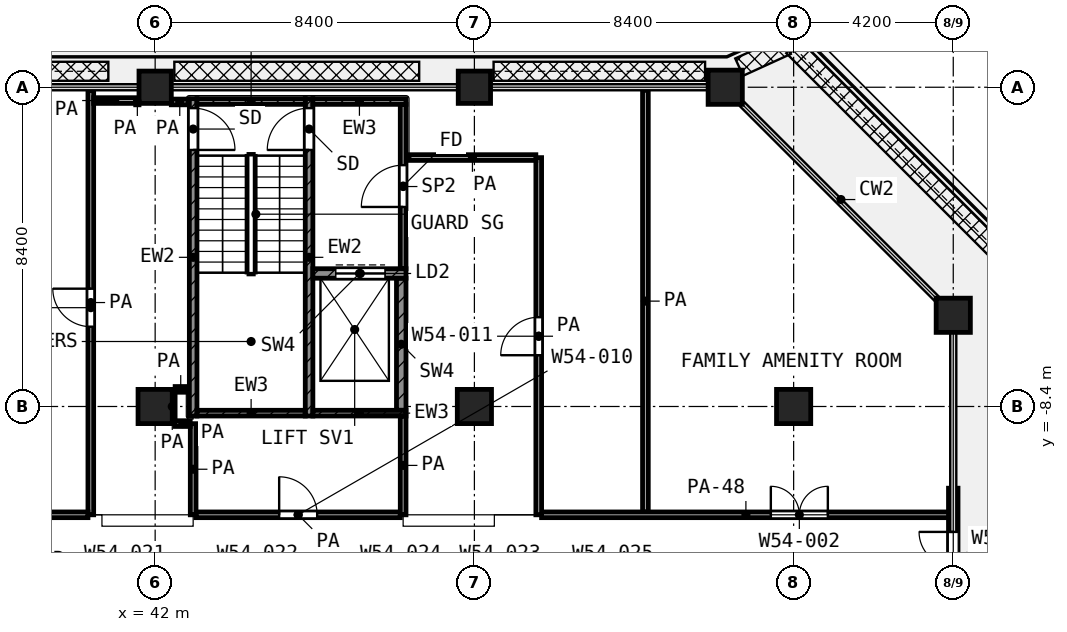
"""IFC4 building model, lengths in metres.
Left out: names, types, materials, properties, quantities, classifications, styles, units other than length and angle.
Written with IfcOpenShell. Run it as: python <this file> out.ifc"""

import sys

from ifc_helpers import new_model, si_unit, direction, frame, frame_2d, origin, origin_2d, place, context, subcontext, project, spatial, rectangle, extrude, element, fill, save


model = new_model("IFC4")
c1 = context("Model", 3, precision=1e-05, world=origin(), true_north=direction((0.0, 1.0)))
c2 = subcontext(c1, "Body", "Model", "MODEL_VIEW")
j1 = project(units=[si_unit("LENGTHUNIT", "METRE"), si_unit("PLANEANGLEUNIT", "RADIAN")], contexts=[c1])
p1 = place(None, origin())
s1 = spatial("IfcSite", under=j1, at=p1, CompositionType="ELEMENT")
p2 = place(p1, origin())
s2 = spatial("IfcBuilding", under=s1, at=p2, CompositionType="ELEMENT")
p3 = place(p2, frame((0.0, 0.0, 255.8)))
s3 = spatial("IfcBuildingStorey", under=s2, at=p3, CompositionType="ELEMENT", Elevation=255.8)
for number, where, z_axis, x_axis in (
    (1, (42.0, 0.0, 0.0), (0.0, 0.0, 1.0), (1.0, 0.0, 0.0)),
    (2, (50.4, 0.0, 0.0), (0.0, 0.0, 1.0), (1.0, 0.0, 0.0)),
):
    element("IfcColumn", number, at=place(p3, frame(where, z_axis=z_axis, x_axis=x_axis)), inside=s3, PredefinedType="COLUMN", context=c2, shape_type="SweptSolid", body=[
        extrude(rectangle(XDim=0.85, YDim=0.85, at=origin_2d()), origin(), (0.0, 0.0, 1.0), 4.2),
    ])
for number, where, z_axis, x_axis in (
    (3, (57.0, 0.0, 0.0), (0.0, 0.0, 1.0), (1.0, 0.0, 0.0)),
    (4, (63.0, -6.0, 0.0), (0.0, 0.0, 1.0), (1.0, 0.0, 0.0)),
    (5, (42.0, -8.4, 0.0), (0.0, 0.0, 1.0), (1.0, 0.0, 0.0)),
    (6, (50.4, -8.4, 0.0), (0.0, 0.0, 1.0), (1.0, 0.0, 0.0)),
    (7, (58.8, -8.4, 0.0), (0.0, 0.0, 1.0), (1.0, 0.0, 0.0)),
):
    element("IfcColumn", number, at=place(p3, frame(where, z_axis=z_axis, x_axis=x_axis)), inside=s3, PredefinedType="COLUMN", context=c2, shape_type="SweptSolid", body=[
        extrude(rectangle(XDim=0.9, YDim=0.9, at=origin_2d()), origin(), (0.0, 0.0, 1.0), 4.2),
    ])
p4 = place(p3, frame((63.0, -14.65, 0.0), z_axis=(0.0, 0.0, 1.0), x_axis=(0.0, 1.0, 0.0)))
e8 = element("IfcWall", 8, at=p4, inside=s3, PredefinedType="SOLIDWALL", context=c2, shape_type="SweptSolid", body=[
    extrude(rectangle(XDim=4.1, YDim=0.25, at=frame_2d((2.05, 0.0))), origin(), (0.0, 0.0, 1.0), 2.58),
])
p5 = place(p4, frame((1.15, 0.0, 0.0)))
e9 = element("IfcOpeningElement", 9, at=p5, cuts=e8, PredefinedType="OPENING", context=c2, shape_type="SweptSolid", body=[
    extrude(rectangle(XDim=1.8, YDim=2.1, at=frame_2d((0.9, 1.05))), frame((0.0, 0.135, 0.0), z_axis=(0.0, -1.0, 0.0), x_axis=(1.0, 0.0, 0.0)), (0.0, 0.0, 1.0), 0.27),
])
p6 = place(p3, frame((43.0, -8.65, 0.0), z_axis=(0.0, 0.0, 1.0), x_axis=(0.0, 1.0, 0.0)))
e10 = element("IfcWall", 10, at=p6, inside=s3, PredefinedType="SHEAR", context=c2, shape_type="SweptSolid", body=[
    extrude(rectangle(XDim=8.35, YDim=0.2, at=frame_2d((4.175, 0.0))), origin(), (0.0, 0.0, 1.0), 3.6),
])
p7 = place(p6, frame((7.0, 0.0, 0.0)))
e11 = element("IfcOpeningElement", 11, at=p7, cuts=e10, PredefinedType="OPENING", context=c2, shape_type="SweptSolid", body=[
    extrude(rectangle(XDim=1.1, YDim=2.1, at=frame_2d((0.55, 1.05))), frame((0.0, 0.11, 0.0), z_axis=(0.0, -1.0, 0.0), x_axis=(1.0, 0.0, 0.0)), (0.0, 0.0, 1.0), 0.22),
])
p8 = place(p3, frame((46.05, -8.65, 0.0), z_axis=(0.0, 0.0, 1.0), x_axis=(0.0, 1.0, 0.0)))
e12 = element("IfcWall", 12, at=p8, inside=s3, PredefinedType="SHEAR", context=c2, shape_type="SweptSolid", body=[
    extrude(rectangle(XDim=8.35, YDim=0.2, at=frame_2d((4.175, 0.0))), origin(), (0.0, 0.0, 1.0), 3.6),
])
p9 = place(p8, frame((7.0, 0.0, 0.0)))
e13 = element("IfcOpeningElement", 13, at=p9, cuts=e12, PredefinedType="OPENING", context=c2, shape_type="SweptSolid", body=[
    extrude(rectangle(XDim=1.1, YDim=2.1, at=frame_2d((0.55, 1.05))), frame((0.0, 0.11, 0.0), z_axis=(0.0, -1.0, 0.0), x_axis=(1.0, 0.0, 0.0)), (0.0, 0.0, 1.0), 0.22),
])
p10 = place(p3, frame((43.1, -0.375, 0.0), z_axis=(0.0, 0.0, 1.0), x_axis=(1.0, 0.0, 0.0)))
e14 = element("IfcWall", 14, at=p10, inside=s3, PredefinedType="SHEAR", context=c2, shape_type="SweptSolid", body=[
    extrude(rectangle(XDim=2.85, YDim=0.15, at=frame_2d((1.425, 0.0))), origin(), (0.0, 0.0, 1.0), 3.6),
])
p11 = place(p3, frame((46.15, -0.375, 0.0), z_axis=(0.0, 0.0, 1.0), x_axis=(1.0, 0.0, 0.0)))
e15 = element("IfcWall", 15, at=p11, inside=s3, PredefinedType="SHEAR", context=c2, shape_type="SweptSolid", body=[
    extrude(rectangle(XDim=2.45, YDim=0.15, at=frame_2d((1.225, 0.0))), origin(), (0.0, 0.0, 1.0), 3.6),
])
p12 = place(p3, frame((43.1, -8.575, 0.0), z_axis=(0.0, 0.0, 1.0), x_axis=(1.0, 0.0, 0.0)))
e16 = element("IfcWall", 16, at=p12, inside=s3, PredefinedType="SHEAR", context=c2, shape_type="SweptSolid", body=[
    extrude(rectangle(XDim=2.85, YDim=0.15, at=frame_2d((1.425, 0.0))), origin(), (0.0, 0.0, 1.0), 3.6),
])
p13 = place(p3, frame((46.15, -8.575, 0.0), z_axis=(0.0, 0.0, 1.0), x_axis=(1.0, 0.0, 0.0)))
e17 = element("IfcWall", 17, at=p13, inside=s3, PredefinedType="SHEAR", context=c2, shape_type="SweptSolid", body=[
    extrude(rectangle(XDim=2.45, YDim=0.15, at=frame_2d((1.225, 0.0))), origin(), (0.0, 0.0, 1.0), 3.6),
])
p14 = place(p3, frame((46.15, -4.9, 0.0), z_axis=(0.0, 0.0, 1.0), x_axis=(1.0, 0.0, 0.0)))
e18 = element("IfcWall", 18, at=p14, inside=s3, PredefinedType="SHEAR", context=c2, shape_type="SweptSolid", body=[
    extrude(rectangle(XDim=2.45, YDim=0.25, at=frame_2d((1.225, 0.0))), origin(), (0.0, 0.0, 1.0), 3.6),
])
p15 = place(p14, frame((0.6, 0.0, 0.0)))
e19 = element("IfcOpeningElement", 19, at=p15, cuts=e18, PredefinedType="OPENING", context=c2, shape_type="SweptSolid", body=[
    extrude(rectangle(XDim=1.3, YDim=2.1, at=frame_2d((0.65, 1.05))), frame((0.0, 0.135, 0.0), z_axis=(0.0, -1.0, 0.0), x_axis=(1.0, 0.0, 0.0)), (0.0, 0.0, 1.0), 0.27),
])
p16 = place(p3, frame((48.475, -8.5, 0.0), z_axis=(0.0, 0.0, 1.0), x_axis=(0.0, 1.0, 0.0)))
e20 = element("IfcWall", 20, at=p16, inside=s3, PredefinedType="SHEAR", context=c2, shape_type="SweptSolid", body=[
    extrude(rectangle(XDim=3.475, YDim=0.25, at=frame_2d((1.738, 0.0))), origin(), (0.0, 0.0, 1.0), 3.6),
])
p17 = place(p3, frame((48.525, -4.775, 0.0), z_axis=(0.0, 0.0, 1.0), x_axis=(0.0, 1.0, 0.0)))
e21 = element("IfcWall", 21, at=p17, inside=s3, PredefinedType="PARTITIONING", context=c2, shape_type="SweptSolid", body=[
    extrude(rectangle(XDim=4.325, YDim=0.15, at=frame_2d((2.163, 0.0))), origin(), (0.0, 0.0, 1.0), 3.6),
])
p18 = place(p17, frame((1.625, 0.0, 0.0)))
e22 = element("IfcOpeningElement", 22, at=p18, cuts=e21, PredefinedType="OPENING", context=c2, shape_type="SweptSolid", body=[
    extrude(rectangle(XDim=1.1, YDim=2.1, at=frame_2d((0.55, 1.05))), frame((0.0, 0.085, 0.0), z_axis=(0.0, -1.0, 0.0), x_axis=(1.0, 0.0, 0.0)), (0.0, 0.0, 1.0), 0.17),
])
p19 = place(p3, frame((29.4, -11.25, 0.0), z_axis=(0.0, 0.0, 1.0), x_axis=(1.0, 0.0, 0.0)))
e23 = element("IfcWall", 23, at=p19, inside=s3, PredefinedType="PARTITIONING", context=c2, shape_type="SweptSolid", body=[
    extrude(rectangle(XDim=10.832, YDim=0.15, at=frame_2d((5.416, 0.0))), origin(), (0.0, 0.0, 1.0), 3.6),
])
p20 = place(p19, frame((1.5, 0.0, 0.0)))
e24 = element("IfcOpeningElement", 24, at=p20, cuts=e23, PredefinedType="OPENING", context=c2, shape_type="SweptSolid", body=[
    extrude(rectangle(XDim=1.2, YDim=2.1, at=frame_2d((0.6, 1.05))), frame((0.0, 0.085, 0.0), z_axis=(0.0, -1.0, 0.0), x_axis=(1.0, 0.0, 0.0)), (0.0, 0.0, 1.0), 0.17),
])
p21 = place(p3, frame((43.075, -11.25, 0.0), z_axis=(0.0, 0.0, 1.0), x_axis=(1.0, 0.0, 0.0)))
e25 = element("IfcWall", 25, at=p21, inside=s3, PredefinedType="PARTITIONING", context=c2, shape_type="SweptSolid", body=[
    extrude(rectangle(XDim=5.375, YDim=0.15, at=frame_2d((2.688, 0.0))), origin(), (0.0, 0.0, 1.0), 3.6),
])
p22 = place(p21, frame((2.188, 0.0, 0.0)))
e26 = element("IfcOpeningElement", 26, at=p22, cuts=e25, PredefinedType="OPENING", context=c2, shape_type="SweptSolid", body=[
    extrude(rectangle(XDim=1.0, YDim=2.1, at=frame_2d((0.5, 1.05))), frame((0.0, 0.085, 0.0), z_axis=(0.0, -1.0, 0.0), x_axis=(1.0, 0.0, 0.0)), (0.0, 0.0, 1.0), 0.17),
])
p23 = place(p3, frame((52.168, -11.25, 0.0), z_axis=(0.0, 0.0, 1.0), x_axis=(1.0, 0.0, 0.0)))
e27 = element("IfcWall", 27, at=p23, inside=s3, PredefinedType="PARTITIONING", context=c2, shape_type="SweptSolid", body=[
    extrude(rectangle(XDim=10.752, YDim=0.15, at=frame_2d((5.376, 0.0))), origin(), (0.0, 0.0, 1.0), 2.7),
])
p24 = place(p23, frame((6.032, 0.0, 0.0)))
e28 = element("IfcOpeningElement", 28, at=p24, cuts=e27, PredefinedType="OPENING", context=c2, shape_type="SweptSolid", body=[
    extrude(rectangle(XDim=1.5, YDim=2.1, at=frame_2d((0.75, 1.05))), frame((0.0, 0.085, 0.0), z_axis=(0.0, -1.0, 0.0), x_axis=(1.0, 0.0, 0.0)), (0.0, 0.0, 1.0), 0.17),
])
p25 = place(p3, frame((42.525, -8.85, 0.0), z_axis=(0.0, 0.0, 1.0), x_axis=(1.0, 0.0, 0.0)))
e29 = element("IfcWall", 29, at=p25, inside=s3, PredefinedType="PARTITIONING", context=c2, shape_type="SweptSolid", body=[
    extrude(rectangle(XDim=0.398, YDim=0.15, at=frame_2d((0.199, 0.0))), origin(), (0.0, 0.0, 1.0), 3.6),
])
p26 = place(p3, frame((42.526, -7.95, 0.0), z_axis=(0.0, 0.0, 1.0), x_axis=(1.0, 0.0, 0.0)))
e30 = element("IfcWall", 30, at=p26, inside=s3, PredefinedType="PARTITIONING", context=c2, shape_type="SweptSolid", body=[
    extrude(rectangle(XDim=0.294, YDim=0.15, at=frame_2d((0.147, 0.0))), origin(), (0.0, 0.0, 1.0), 3.6),
])
p27 = place(p3, frame((48.68, -1.85, 0.0), z_axis=(0.0, 0.0, 1.0), x_axis=(1.0, 0.0, 0.0)))
e31 = element("IfcWall", 31, at=p27, inside=s3, PredefinedType="PARTITIONING", context=c2, shape_type="SweptSolid", body=[
    extrude(rectangle(XDim=3.337, YDim=0.15, at=frame_2d((1.668, 0.0))), origin(), (0.0, 0.0, 1.0), 3.6),
])
p28 = place(p3, frame((41.488, -0.387, 0.0), z_axis=(0.0, 0.0, 1.0), x_axis=(1.0, 0.0, 0.0)))
e32 = element("IfcWall", 32, at=p28, inside=s3, PredefinedType="PARTITIONING", context=c2, shape_type="SweptSolid", body=[
    extrude(rectangle(XDim=0.087, YDim=0.15, at=frame_2d((0.043, 0.0))), origin(), (0.0, 0.0, 1.0), 3.6),
])
p29 = place(p3, frame((42.425, -0.387, 0.0), z_axis=(0.0, 0.0, 1.0), x_axis=(1.0, 0.0, 0.0)))
e33 = element("IfcWall", 33, at=p29, inside=s3, PredefinedType="PARTITIONING", context=c2, shape_type="SweptSolid", body=[
    extrude(rectangle(XDim=0.445, YDim=0.15, at=frame_2d((0.223, 0.0))), origin(), (0.0, 0.0, 1.0), 3.6),
])
p30 = place(p3, frame((40.382, -0.35, 0.0), z_axis=(0.0, 0.0, 1.0), x_axis=(1.0, 0.0, 0.0)))
e34 = element("IfcWall", 34, at=p30, inside=s3, PredefinedType="PARTITIONING", context=c2, shape_type="SweptSolid", body=[
    extrude(rectangle(XDim=1.106, YDim=0.15, at=frame_2d((0.553, 0.0))), origin(), (0.0, 0.0, 1.0), 3.6),
])
p31 = place(p3, frame((40.307, -11.25, 0.0), z_axis=(0.0, 0.0, 1.0), x_axis=(0.0, 1.0, 0.0)))
e35 = element("IfcWall", 35, at=p31, inside=s3, PredefinedType="PARTITIONING", context=c2, shape_type="SweptSolid", body=[
    extrude(rectangle(XDim=11.17, YDim=0.15, at=frame_2d((5.585, 0.0))), origin(), (0.0, 0.0, 1.0), 3.6),
])
p32 = place(p31, frame((4.95, 0.0, 0.0)))
e36 = element("IfcOpeningElement", 36, at=p32, cuts=e35, PredefinedType="OPENING", context=c2, shape_type="SweptSolid", body=[
    extrude(rectangle(XDim=1.0, YDim=2.1, at=frame_2d((0.5, 1.05))), frame((0.0, 0.085, 0.0), z_axis=(0.0, -1.0, 0.0), x_axis=(1.0, 0.0, 0.0)), (0.0, 0.0, 1.0), 0.17),
])
p33 = place(p3, frame((42.45, -8.85, 0.0), z_axis=(0.0, 0.0, 1.0), x_axis=(0.0, 1.0, 0.0)))
e37 = element("IfcWall", 37, at=p33, inside=s3, PredefinedType="PARTITIONING", context=c2, shape_type="SweptSolid", body=[
    extrude(rectangle(XDim=0.899, YDim=0.15, at=frame_2d((0.45, 0.0))), origin(), (0.0, 0.0, 1.0), 3.6),
])
p34 = place(p3, frame((43.0, -11.25, 0.0), z_axis=(0.0, 0.0, 1.0), x_axis=(0.0, 1.0, 0.0)))
e38 = element("IfcWall", 38, at=p34, inside=s3, PredefinedType="PARTITIONING", context=c2, shape_type="SweptSolid", body=[
    extrude(rectangle(XDim=2.398, YDim=0.15, at=frame_2d((1.199, 0.0))), origin(), (0.0, 0.0, 1.0), 3.6),
])
p35 = place(p3, frame((48.525, -11.25, 0.0), z_axis=(0.0, 0.0, 1.0), x_axis=(0.0, 1.0, 0.0)))
e39 = element("IfcWall", 39, at=p35, inside=s3, PredefinedType="PARTITIONING", context=c2, shape_type="SweptSolid", body=[
    extrude(rectangle(XDim=2.6, YDim=0.15, at=frame_2d((1.3, 0.0))), origin(), (0.0, 0.0, 1.0), 3.6),
])
p36 = place(p3, frame((52.093, -11.25, 0.0), z_axis=(0.0, 0.0, 1.0), x_axis=(0.0, 1.0, 0.0)))
e40 = element("IfcWall", 40, at=p36, inside=s3, PredefinedType="PARTITIONING", context=c2, shape_type="SweptSolid", body=[
    extrude(rectangle(XDim=9.398, YDim=0.15, at=frame_2d((4.699, 0.0))), origin(), (0.0, 0.0, 1.0), 3.6),
])
p37 = place(p36, frame((4.199, 0.0, 0.0)))
e41 = element("IfcOpeningElement", 41, at=p37, cuts=e40, PredefinedType="OPENING", context=c2, shape_type="SweptSolid", body=[
    extrude(rectangle(XDim=1.0, YDim=2.1, at=frame_2d((0.5, 1.05))), frame((0.0, 0.085, 0.0), z_axis=(0.0, -1.0, 0.0), x_axis=(1.0, 0.0, 0.0)), (0.0, 0.0, 1.0), 0.17),
])
p38 = place(p3, frame((54.9, -11.175, 0.0), z_axis=(0.0, 0.0, 1.0), x_axis=(0.0, 1.0, 0.0)))
e42 = element("IfcWall", 42, at=p38, inside=s3, PredefinedType="PARTITIONING", context=c2, shape_type="SweptSolid", body=[
    extrude(rectangle(XDim=11.095, YDim=0.15, at=frame_2d((5.547, 0.0))), origin(), (0.0, 0.0, 1.0), 3.6),
])
p39 = place(p5, origin())
e43 = element("IfcDoor", 43, at=p39, inside=s3, OperationType="DOUBLE_DOOR_SINGLE_SWING", PredefinedType="DOOR", context=c2, shape_type="SweptSolid", body=[
    extrude(rectangle(XDim=1.8, YDim=2.1, at=frame_2d((0.9, 1.05))), frame((0.0, 0.025, 0.0), z_axis=(0.0, -1.0, 0.0), x_axis=(1.0, 0.0, 0.0)), (0.0, 0.0, 1.0), 0.05),
])
fill(e9, e43)
p40 = place(p7, frame((1.1, 0.0, 0.0), z_axis=(0.0, 0.0, 1.0), x_axis=(-1.0, 0.0, 0.0)))
e44 = element("IfcDoor", 44, at=p40, inside=s3, OperationType="SINGLE_SWING_LEFT", PredefinedType="DOOR", context=c2, shape_type="SweptSolid", body=[
    extrude(rectangle(XDim=1.1, YDim=2.1, at=frame_2d((0.55, 1.05))), frame((0.0, 0.025, 0.0), z_axis=(0.0, -1.0, 0.0), x_axis=(1.0, 0.0, 0.0)), (0.0, 0.0, 1.0), 0.05),
])
fill(e11, e44)
p41 = place(p9, origin())
e45 = element("IfcDoor", 45, at=p41, inside=s3, OperationType="SINGLE_SWING_LEFT", PredefinedType="DOOR", context=c2, shape_type="SweptSolid", body=[
    extrude(rectangle(XDim=1.1, YDim=2.1, at=frame_2d((0.55, 1.05))), frame((0.0, 0.025, 0.0), z_axis=(0.0, -1.0, 0.0), x_axis=(1.0, 0.0, 0.0)), (0.0, 0.0, 1.0), 0.05),
])
fill(e13, e45)
p42 = place(p15, origin())
e46 = element("IfcDoor", 46, at=p42, inside=s3, OperationType="DOUBLE_DOOR_SLIDING", PredefinedType="DOOR", context=c2, shape_type="SweptSolid", body=[
    extrude(rectangle(XDim=1.3, YDim=2.1, at=frame_2d((0.65, 1.05))), frame((0.0, 0.025, 0.0), z_axis=(0.0, -1.0, 0.0), x_axis=(1.0, 0.0, 0.0)), (0.0, 0.0, 1.0), 0.05),
])
fill(e19, e46)
p43 = place(p18, origin())
e47 = element("IfcDoor", 47, at=p43, inside=s3, OperationType="SINGLE_SWING_LEFT", PredefinedType="DOOR", context=c2, shape_type="SweptSolid", body=[
    extrude(rectangle(XDim=1.1, YDim=2.1, at=frame_2d((0.55, 1.05))), frame((0.0, 0.025, 0.0), z_axis=(0.0, -1.0, 0.0), x_axis=(1.0, 0.0, 0.0)), (0.0, 0.0, 1.0), 0.05),
])
fill(e22, e47)
p44 = place(p32, origin())
e48 = element("IfcDoor", 48, at=p44, inside=s3, OperationType="SINGLE_SWING_RIGHT", PredefinedType="DOOR", context=c2, shape_type="SweptSolid", body=[
    extrude(rectangle(XDim=1.0, YDim=2.1, at=frame_2d((0.5, 1.05))), frame((0.0, 0.025, 0.0), z_axis=(0.0, -1.0, 0.0), x_axis=(1.0, 0.0, 0.0)), (0.0, 0.0, 1.0), 0.05),
])
fill(e36, e48)
p45 = place(p22, origin())
e49 = element("IfcDoor", 49, at=p45, inside=s3, OperationType="SINGLE_SWING_LEFT", PredefinedType="DOOR", context=c2, shape_type="SweptSolid", body=[
    extrude(rectangle(XDim=1.0, YDim=2.1, at=frame_2d((0.5, 1.05))), frame((0.0, 0.025, 0.0), z_axis=(0.0, -1.0, 0.0), x_axis=(1.0, 0.0, 0.0)), (0.0, 0.0, 1.0), 0.05),
])
fill(e26, e49)
p46 = place(p37, origin())
e50 = element("IfcDoor", 50, at=p46, inside=s3, OperationType="SINGLE_SWING_LEFT", PredefinedType="DOOR", context=c2, shape_type="SweptSolid", body=[
    extrude(rectangle(XDim=1.0, YDim=2.1, at=frame_2d((0.5, 1.05))), frame((0.0, 0.025, 0.0), z_axis=(0.0, -1.0, 0.0), x_axis=(1.0, 0.0, 0.0)), (0.0, 0.0, 1.0), 0.05),
])
fill(e41, e50)
p47 = place(p24, origin())
e51 = element("IfcDoor", 51, at=p47, inside=s3, OperationType="DOUBLE_DOOR_SINGLE_SWING", PredefinedType="DOOR", context=c2, shape_type="SweptSolid", body=[
    extrude(rectangle(XDim=1.5, YDim=2.1, at=frame_2d((0.75, 1.05))), frame((0.0, 0.025, 0.0), z_axis=(0.0, -1.0, 0.0), x_axis=(1.0, 0.0, 0.0)), (0.0, 0.0, 1.0), 0.05),
])
fill(e28, e51)
save(model, sys.argv[1])
